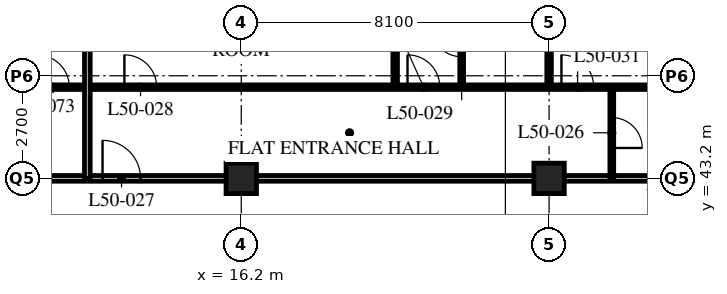
"""IFC4 building model, lengths in metres.
Left out: names, types, materials, properties, quantities, classifications, styles, units other than length and angle.
Written with IfcOpenShell. Run it as: python <this file> out.ifc"""

import sys

from ifc_helpers import new_model, si_unit, direction, frame, frame_2d, origin, origin_2d, place, context, subcontext, project, spatial, rectangle, hollow_rectangle, extrude, element, fill, save


model = new_model("IFC4")
c1 = context("Model", 3, precision=1e-05, world=origin(), true_north=direction((0.0, 1.0)))
c2 = subcontext(c1, "Body", "Model", "MODEL_VIEW")
j1 = project(units=[si_unit("LENGTHUNIT", "METRE"), si_unit("PLANEANGLEUNIT", "RADIAN")], contexts=[c1])
p1 = place(None, origin())
s1 = spatial("IfcSite", under=j1, at=p1, CompositionType="ELEMENT")
p2 = place(p1, origin())
s2 = spatial("IfcBuilding", under=s1, at=p2, CompositionType="ELEMENT")
p3 = place(p2, frame((0.0, 0.0, 195.6)))
s3 = spatial("IfcBuildingStorey", under=s2, at=p3, CompositionType="ELEMENT", Elevation=195.6)
for number, where, z_axis, x_axis in (
    (1, (16.2, 43.2, 0.0), (0.0, 0.0, 1.0), (1.0, 0.0, 0.0)),
    (2, (24.3, 43.2, 0.0), (0.0, 0.0, 1.0), (1.0, 0.0, 0.0)),
):
    element("IfcColumn", number, at=place(p3, frame(where, z_axis=z_axis, x_axis=x_axis)), inside=s3, PredefinedType="COLUMN", context=c2, shape_type="SweptSolid", body=[
        extrude(hollow_rectangle(XDim=0.8, YDim=0.8, WallThickness=0.08, at=origin_2d()), origin(), (0.0, 0.0, 1.0), 3.6),
    ])
p4 = place(p3, frame((8.1, 43.2, 0.0), z_axis=(0.0, 0.0, 1.0), x_axis=(1.0, 0.0, 0.0)))
e3 = element("IfcWall", 3, at=p4, inside=s3, PredefinedType="PARTITIONING", context=c2, shape_type="SweptSolid", body=[
    extrude(rectangle(XDim=40.5, YDim=0.15, at=frame_2d((20.25, 0.0))), origin(), (0.0, 0.0, 1.0), 2.778),
])
p5 = place(p4, frame((4.45, 0.0, 0.0)))
e4 = element("IfcOpeningElement", 4, at=p5, cuts=e3, PredefinedType="OPENING", context=c2, shape_type="SweptSolid", body=[
    extrude(rectangle(XDim=1.0, YDim=2.1, at=frame_2d((0.5, 1.05))), frame((0.0, 0.085, 0.0), z_axis=(0.0, -1.0, 0.0), x_axis=(1.0, 0.0, 0.0)), (0.0, 0.0, 1.0), 0.17),
])
p6 = place(p4, frame((20.65, 0.0, 0.0)))
e5 = element("IfcOpeningElement", 5, at=p6, cuts=e3, PredefinedType="OPENING", context=c2, shape_type="SweptSolid", body=[
    extrude(rectangle(XDim=1.0, YDim=2.1, at=frame_2d((0.5, 1.05))), frame((0.0, 0.085, 0.0), z_axis=(0.0, -1.0, 0.0), x_axis=(1.0, 0.0, 0.0)), (0.0, 0.0, 1.0), 0.17),
])
p7 = place(p4, frame((28.75, 0.0, 0.0)))
e6 = element("IfcOpeningElement", 6, at=p7, cuts=e3, PredefinedType="OPENING", context=c2, shape_type="SweptSolid", body=[
    extrude(rectangle(XDim=1.0, YDim=2.1, at=frame_2d((0.5, 1.05))), frame((0.0, 0.085, 0.0), z_axis=(0.0, -1.0, 0.0), x_axis=(1.0, 0.0, 0.0)), (0.0, 0.0, 1.0), 0.17),
])
p8 = place(p4, frame((37.975, 0.0, 0.0)))
e7 = element("IfcOpeningElement", 7, at=p8, cuts=e3, PredefinedType="OPENING", context=c2, shape_type="SweptSolid", body=[
    extrude(rectangle(XDim=1.0, YDim=2.1, at=frame_2d((0.5, 1.05))), frame((0.0, 0.085, 0.0), z_axis=(0.0, -1.0, 0.0), x_axis=(1.0, 0.0, 0.0)), (0.0, 0.0, 1.0), 0.17),
])
p9 = place(p4, frame((1.525, 0.0, 0.0)))
e8 = element("IfcOpeningElement", 8, at=p9, cuts=e3, PredefinedType="OPENING", context=c2, shape_type="SweptSolid", body=[
    extrude(rectangle(XDim=1.0, YDim=2.1, at=frame_2d((0.5, 1.05))), frame((0.0, 0.085, 0.0), z_axis=(0.0, -1.0, 0.0), x_axis=(1.0, 0.0, 0.0)), (0.0, 0.0, 1.0), 0.17),
])
p10 = place(p3, frame((25.95, 43.2, 0.0), z_axis=(0.0, 0.0, 1.0), x_axis=(0.0, 1.0, 0.0)))
e9 = element("IfcWall", 9, at=p10, inside=s3, PredefinedType="PARTITIONING", context=c2, shape_type="SweptSolid", body=[
    extrude(rectangle(XDim=2.4, YDim=0.1, at=frame_2d((1.2, 0.0))), origin(), (0.0, 0.0, 1.0), 3.39),
])
p11 = place(p10, frame((0.8, 0.0, 0.0)))
e10 = element("IfcOpeningElement", 10, at=p11, cuts=e9, PredefinedType="OPENING", context=c2, shape_type="SweptSolid", body=[
    extrude(rectangle(XDim=0.8, YDim=2.1, at=frame_2d((0.4, 1.05))), frame((0.0, 0.06, 0.0), z_axis=(0.0, -1.0, 0.0), x_axis=(1.0, 0.0, 0.0)), (0.0, 0.0, 1.0), 0.12),
])
p12 = place(p3, frame((22.0, 45.6, 0.0), z_axis=(0.0, 0.0, 1.0), x_axis=(0.0, 1.0, 0.0)))
e11 = element("IfcWall", 11, at=p12, inside=s3, PredefinedType="PARTITIONING", context=c2, shape_type="SweptSolid", body=[
    extrude(rectangle(XDim=2.4, YDim=0.1, at=frame_2d((1.2, 0.0))), origin(), (0.0, 0.0, 1.0), 3.39),
])
p13 = place(p12, frame((0.8, 0.0, 0.0)))
e12 = element("IfcOpeningElement", 12, at=p13, cuts=e11, PredefinedType="OPENING", context=c2, shape_type="SweptSolid", body=[
    extrude(rectangle(XDim=0.8, YDim=2.1, at=frame_2d((0.4, 1.05))), frame((0.0, 0.06, 0.0), z_axis=(0.0, -1.0, 0.0), x_axis=(1.0, 0.0, 0.0)), (0.0, 0.0, 1.0), 0.12),
])
p14 = place(p3, frame((20.25, 45.6, 0.0), z_axis=(0.0, 0.0, 1.0), x_axis=(0.0, 1.0, 0.0)))
e13 = element("IfcWall", 13, at=p14, inside=s3, PredefinedType="PARTITIONING", context=c2, shape_type="SweptSolid", body=[
    extrude(rectangle(XDim=13.5, YDim=0.12, at=frame_2d((6.75, 0.0))), origin(), (0.0, 0.0, 1.0), 3.39),
])
p15 = place(p3, frame((24.3, 45.6, 0.0), z_axis=(0.0, 0.0, 1.0), x_axis=(0.0, 1.0, 0.0)))
e14 = element("IfcWall", 14, at=p15, inside=s3, PredefinedType="PARTITIONING", context=c2, shape_type="SweptSolid", body=[
    extrude(rectangle(XDim=13.5, YDim=0.12, at=frame_2d((6.75, 0.0))), origin(), (0.0, 0.0, 1.0), 2.778),
])
p16 = place(p3, frame((4.1, 45.6, 0.0), z_axis=(0.0, 0.0, 1.0), x_axis=(1.0, 0.0, 0.0)))
e15 = element("IfcWall", 15, at=p16, inside=s3, PredefinedType="PARTITIONING", context=c2, shape_type="SweptSolid", body=[
    extrude(rectangle(XDim=48.5, YDim=0.12, at=frame_2d((24.25, 0.0))), origin(), (0.0, 0.0, 1.0), 3.39),
])
p17 = place(p16, frame((9.025, 0.0, 0.0)))
e16 = element("IfcOpeningElement", 16, at=p17, cuts=e15, PredefinedType="OPENING", context=c2, shape_type="SweptSolid", body=[
    extrude(rectangle(XDim=0.85, YDim=2.1, at=frame_2d((0.425, 1.05))), frame((0.0, 0.07, 0.0), z_axis=(0.0, -1.0, 0.0), x_axis=(1.0, 0.0, 0.0)), (0.0, 0.0, 1.0), 0.14),
])
p18 = place(p16, frame((16.475, 0.0, 0.0)))
e17 = element("IfcOpeningElement", 17, at=p18, cuts=e15, PredefinedType="OPENING", context=c2, shape_type="SweptSolid", body=[
    extrude(rectangle(XDim=0.85, YDim=2.1, at=frame_2d((0.425, 1.05))), frame((0.0, 0.07, 0.0), z_axis=(0.0, -1.0, 0.0), x_axis=(1.0, 0.0, 0.0)), (0.0, 0.0, 1.0), 0.14),
])
p19 = place(p16, frame((20.525, 0.0, 0.0)))
e18 = element("IfcOpeningElement", 18, at=p19, cuts=e15, PredefinedType="OPENING", context=c2, shape_type="SweptSolid", body=[
    extrude(rectangle(XDim=0.85, YDim=2.1, at=frame_2d((0.425, 1.05))), frame((0.0, 0.07, 0.0), z_axis=(0.0, -1.0, 0.0), x_axis=(1.0, 0.0, 0.0)), (0.0, 0.0, 1.0), 0.14),
])
p20 = place(p16, frame((25.225, 0.0, 0.0)))
e19 = element("IfcOpeningElement", 19, at=p20, cuts=e15, PredefinedType="OPENING", context=c2, shape_type="SweptSolid", body=[
    extrude(rectangle(XDim=0.85, YDim=2.1, at=frame_2d((0.425, 1.05))), frame((0.0, 0.07, 0.0), z_axis=(0.0, -1.0, 0.0), x_axis=(1.0, 0.0, 0.0)), (0.0, 0.0, 1.0), 0.14),
])
p21 = place(p16, frame((28.625, 0.0, 0.0)))
e20 = element("IfcOpeningElement", 20, at=p21, cuts=e15, PredefinedType="OPENING", context=c2, shape_type="SweptSolid", body=[
    extrude(rectangle(XDim=0.85, YDim=2.1, at=frame_2d((0.425, 1.05))), frame((0.0, 0.07, 0.0), z_axis=(0.0, -1.0, 0.0), x_axis=(1.0, 0.0, 0.0)), (0.0, 0.0, 1.0), 0.14),
])
p22 = place(p16, frame((33.325, 0.0, 0.0)))
e21 = element("IfcOpeningElement", 21, at=p22, cuts=e15, PredefinedType="OPENING", context=c2, shape_type="SweptSolid", body=[
    extrude(rectangle(XDim=0.85, YDim=2.1, at=frame_2d((0.425, 1.05))), frame((0.0, 0.07, 0.0), z_axis=(0.0, -1.0, 0.0), x_axis=(1.0, 0.0, 0.0)), (0.0, 0.0, 1.0), 0.14),
])
p23 = place(p16, frame((36.725, 0.0, 0.0)))
e22 = element("IfcOpeningElement", 22, at=p23, cuts=e15, PredefinedType="OPENING", context=c2, shape_type="SweptSolid", body=[
    extrude(rectangle(XDim=0.85, YDim=2.1, at=frame_2d((0.425, 1.05))), frame((0.0, 0.07, 0.0), z_axis=(0.0, -1.0, 0.0), x_axis=(1.0, 0.0, 0.0)), (0.0, 0.0, 1.0), 0.14),
])
p24 = place(p16, frame((40.925, 0.0, 0.0)))
e23 = element("IfcOpeningElement", 23, at=p24, cuts=e15, PredefinedType="OPENING", context=c2, shape_type="SweptSolid", body=[
    extrude(rectangle(XDim=0.85, YDim=2.1, at=frame_2d((0.425, 1.05))), frame((0.0, 0.07, 0.0), z_axis=(0.0, -1.0, 0.0), x_axis=(1.0, 0.0, 0.0)), (0.0, 0.0, 1.0), 0.14),
])
p25 = place(p16, frame((44.775, 0.0, 0.0)))
e24 = element("IfcOpeningElement", 24, at=p25, cuts=e15, PredefinedType="OPENING", context=c2, shape_type="SweptSolid", body=[
    extrude(rectangle(XDim=0.85, YDim=2.1, at=frame_2d((0.425, 1.05))), frame((0.0, 0.07, 0.0), z_axis=(0.0, -1.0, 0.0), x_axis=(1.0, 0.0, 0.0)), (0.0, 0.0, 1.0), 0.14),
])
p26 = place(p16, frame((6.725, 0.0, 0.0)))
e25 = element("IfcOpeningElement", 25, at=p26, cuts=e15, PredefinedType="OPENING", context=c2, shape_type="SweptSolid", body=[
    extrude(rectangle(XDim=0.85, YDim=2.1, at=frame_2d((0.425, 1.05))), frame((0.0, 0.07, 0.0), z_axis=(0.0, -1.0, 0.0), x_axis=(1.0, 0.0, 0.0)), (0.0, 0.0, 1.0), 0.14),
])
p27 = place(p16, frame((2.875, 0.0, 0.0)))
e26 = element("IfcOpeningElement", 26, at=p27, cuts=e15, PredefinedType="OPENING", context=c2, shape_type="SweptSolid", body=[
    extrude(rectangle(XDim=0.85, YDim=2.1, at=frame_2d((0.425, 1.05))), frame((0.0, 0.07, 0.0), z_axis=(0.0, -1.0, 0.0), x_axis=(1.0, 0.0, 0.0)), (0.0, 0.0, 1.0), 0.14),
])
p28 = place(p3, frame((12.15, 43.2, 0.0), z_axis=(0.0, 0.0, 1.0), x_axis=(0.0, 1.0, 0.0)))
e27 = element("IfcWall", 27, at=p28, inside=s3, PredefinedType="PARTITIONING", context=c2, shape_type="SweptSolid", body=[
    extrude(rectangle(XDim=15.9, YDim=0.15, at=frame_2d((7.95, 0.0))), origin(), (0.0, 0.0, 1.0), 3.39),
])
p29 = place(p11, origin())
e28 = element("IfcDoor", 28, at=p29, inside=s3, OperationType="SINGLE_SWING_RIGHT", PredefinedType="DOOR", context=c2, shape_type="SweptSolid", body=[
    extrude(rectangle(XDim=0.8, YDim=2.1, at=frame_2d((0.4, 1.05))), frame((0.0, 0.025, 0.0), z_axis=(0.0, -1.0, 0.0), x_axis=(1.0, 0.0, 0.0)), (0.0, 0.0, 1.0), 0.05),
])
fill(e10, e28)
p30 = place(p5, origin())
e29 = element("IfcDoor", 29, at=p30, inside=s3, OperationType="SINGLE_SWING_LEFT", PredefinedType="DOOR", context=c2, shape_type="SweptSolid", body=[
    extrude(rectangle(XDim=1.0, YDim=2.1, at=frame_2d((0.5, 1.05))), frame((0.0, 0.025, 0.0), z_axis=(0.0, -1.0, 0.0), x_axis=(1.0, 0.0, 0.0)), (0.0, 0.0, 1.0), 0.05),
])
fill(e4, e29)
p31 = place(p17, origin())
e30 = element("IfcDoor", 30, at=p31, inside=s3, OperationType="SINGLE_SWING_LEFT", PredefinedType="DOOR", context=c2, shape_type="SweptSolid", body=[
    extrude(rectangle(XDim=0.85, YDim=2.1, at=frame_2d((0.425, 1.05))), frame((0.0, 0.025, 0.0), z_axis=(0.0, -1.0, 0.0), x_axis=(1.0, 0.0, 0.0)), (0.0, 0.0, 1.0), 0.05),
])
fill(e16, e30)
p32 = place(p13, origin())
e31 = element("IfcDoor", 31, at=p32, inside=s3, OperationType="SINGLE_SWING_RIGHT", PredefinedType="DOOR", context=c2, shape_type="SweptSolid", body=[
    extrude(rectangle(XDim=0.8, YDim=2.1, at=frame_2d((0.4, 1.05))), frame((0.0, 0.025, 0.0), z_axis=(0.0, -1.0, 0.0), x_axis=(1.0, 0.0, 0.0)), (0.0, 0.0, 1.0), 0.05),
])
fill(e12, e31)
p33 = place(p18, origin())
e32 = element("IfcDoor", 32, at=p33, inside=s3, OperationType="SINGLE_SWING_LEFT", PredefinedType="DOOR", context=c2, shape_type="SweptSolid", body=[
    extrude(rectangle(XDim=0.85, YDim=2.1, at=frame_2d((0.425, 1.05))), frame((0.0, 0.025, 0.0), z_axis=(0.0, -1.0, 0.0), x_axis=(1.0, 0.0, 0.0)), (0.0, 0.0, 1.0), 0.05),
])
fill(e17, e32)
p34 = place(p19, origin())
e33 = element("IfcDoor", 33, at=p34, inside=s3, OperationType="SINGLE_SWING_LEFT", PredefinedType="DOOR", context=c2, shape_type="SweptSolid", body=[
    extrude(rectangle(XDim=0.85, YDim=2.1, at=frame_2d((0.425, 1.05))), frame((0.0, 0.025, 0.0), z_axis=(0.0, -1.0, 0.0), x_axis=(1.0, 0.0, 0.0)), (0.0, 0.0, 1.0), 0.05),
])
fill(e18, e33)
p35 = place(p26, origin())
e34 = element("IfcDoor", 34, at=p35, inside=s3, OperationType="SINGLE_SWING_LEFT", PredefinedType="DOOR", context=c2, shape_type="SweptSolid", body=[
    extrude(rectangle(XDim=0.85, YDim=2.1, at=frame_2d((0.425, 1.05))), frame((0.0, 0.025, 0.0), z_axis=(0.0, -1.0, 0.0), x_axis=(1.0, 0.0, 0.0)), (0.0, 0.0, 1.0), 0.05),
])
fill(e25, e34)
save(model, sys.argv[1])
